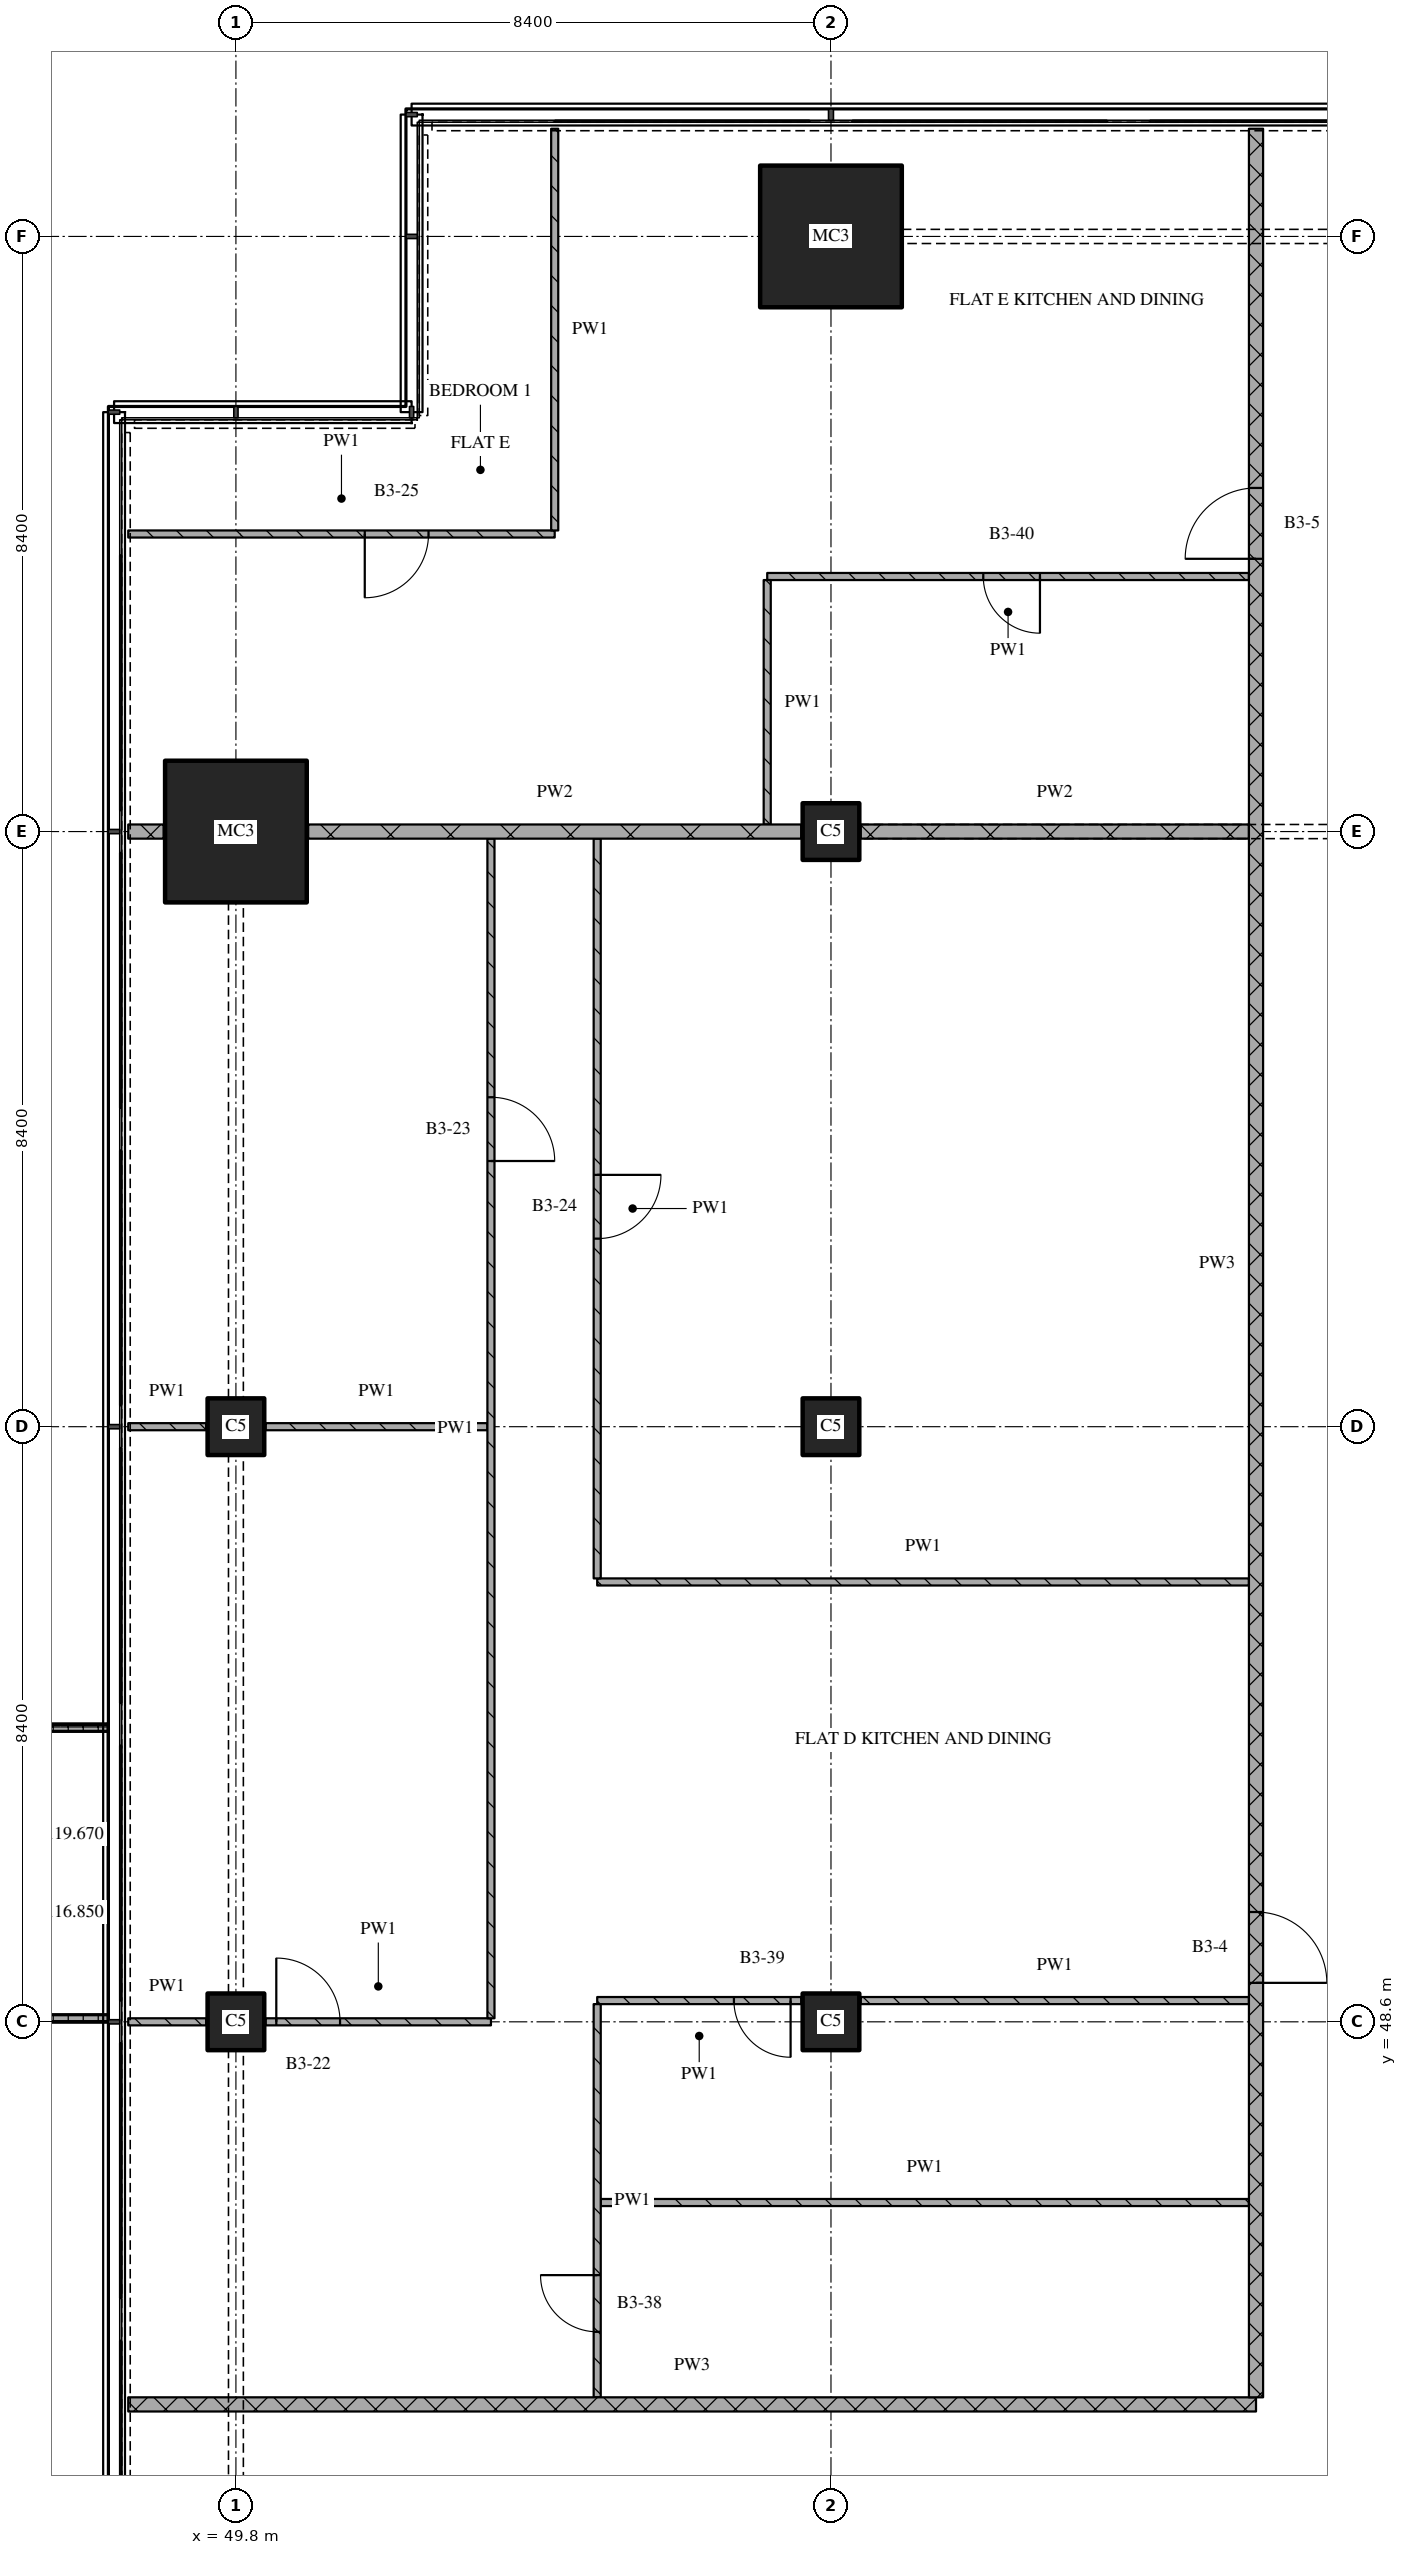
"""IFC4 building model, lengths in metres.
Left out: names, types, materials, properties, quantities, classifications, styles, units other than length and angle.
Written with IfcOpenShell. Run it as: python <this file> out.ifc"""

import sys

from ifc_helpers import new_model, si_unit, direction, frame, frame_2d, origin, origin_2d, place, context, subcontext, project, spatial, polyline, rectangle, outline, extrude, element, fill, save


model = new_model("IFC4")
c1 = context("Model", 3, precision=1e-05, world=origin(), true_north=direction((0.0, 1.0)))
c2 = subcontext(c1, "Body", "Model", "MODEL_VIEW")
j1 = project(units=[si_unit("LENGTHUNIT", "METRE"), si_unit("PLANEANGLEUNIT", "RADIAN")], contexts=[c1])
p1 = place(None, origin())
s1 = spatial("IfcSite", under=j1, at=p1, CompositionType="ELEMENT")
p2 = place(p1, origin())
s2 = spatial("IfcBuilding", under=s1, at=p2, CompositionType="ELEMENT")
p3 = place(p2, frame((0.0, 0.0, 116.85)))
s3 = spatial("IfcBuildingStorey", under=s2, at=p3, CompositionType="ELEMENT", Elevation=116.85)
for number, where, z_axis, x_axis in (
    (1, (49.8, 48.6, 0.0), (0.0, 0.0, 1.0), (1.0, 0.0, 0.0)),
    (2, (49.8, 57.0, 0.0), (0.0, 0.0, 1.0), (1.0, 0.0, 0.0)),
):
    element("IfcColumn", number, at=place(p3, frame(where, z_axis=z_axis, x_axis=x_axis)), inside=s3, PredefinedType="COLUMN", context=c2, shape_type="SweptSolid", body=[
        extrude(rectangle(XDim=0.8, YDim=0.8, at=origin_2d()), origin(), (0.0, 0.0, 1.0), 3.6),
    ])
p4 = place(p3, frame((49.8, 65.4, 0.0), z_axis=(0.0, 0.0, 1.0), x_axis=(1.0, 0.0, 0.0)))
e3 = element("IfcColumn", 3, at=p4, inside=s3, PredefinedType="COLUMN", context=c2, shape_type="SweptSolid", body=[
    extrude(rectangle(XDim=2.0, YDim=2.0, at=origin_2d()), origin(), (0.0, 0.0, 1.0), 3.6),
])
for number, where, z_axis, x_axis in (
    (4, (58.2, 48.6, 0.0), (0.0, 0.0, 1.0), (1.0, 0.0, 0.0)),
    (5, (58.2, 57.0, 0.0), (0.0, 0.0, 1.0), (1.0, 0.0, 0.0)),
    (6, (58.2, 65.4, 0.0), (0.0, 0.0, 1.0), (1.0, 0.0, 0.0)),
):
    element("IfcColumn", number, at=place(p3, frame(where, z_axis=z_axis, x_axis=x_axis)), inside=s3, PredefinedType="COLUMN", context=c2, shape_type="SweptSolid", body=[
        extrude(rectangle(XDim=0.8, YDim=0.8, at=origin_2d()), origin(), (0.0, 0.0, 1.0), 3.6),
    ])
p5 = place(p3, frame((58.2, 73.8, 0.0), z_axis=(0.0, 0.0, 1.0), x_axis=(1.0, 0.0, 0.0)))
e7 = element("IfcColumn", 7, at=p5, inside=s3, PredefinedType="COLUMN", context=c2, shape_type="SweptSolid", body=[
    extrude(rectangle(XDim=2.0, YDim=2.0, at=origin_2d()), origin(), (0.0, 0.0, 1.0), 3.6),
])
p6 = place(p3, origin())
e8 = element("IfcWall", 8, at=p6, inside=s3, PredefinedType="SOLIDWALL", context=c2, shape_type="SweptSolid", body=[
    extrude(outline(polyline([(48.0, 52.8), (48.0, 52.7), (46.367, 52.7), (46.367, 48.7), (48.0, 48.7), (48.0, 48.6), (46.267, 48.6), (46.267, 52.8), (48.0, 52.8)])), origin(), (0.0, 0.0, 1.0), 1.0),
])
p7 = place(p3, frame((48.28, 43.2, 0.0), z_axis=(0.0, 0.0, 1.0), x_axis=(1.0, 0.0, 0.0)))
e9 = element("IfcWall", 9, at=p7, inside=s3, PredefinedType="PARTITIONING", context=c2, shape_type="SweptSolid", body=[
    extrude(rectangle(XDim=15.92, YDim=0.2, at=frame_2d((7.96, 0.0))), origin(), (0.0, 0.0, 1.0), 3.32),
])
p8 = place(p3, frame((54.95, 46.05, 0.0), z_axis=(0.0, 0.0, 1.0), x_axis=(1.0, 0.0, 0.0)))
e10 = element("IfcWall", 10, at=p8, inside=s3, PredefinedType="PARTITIONING", context=c2, shape_type="SweptSolid", body=[
    extrude(rectangle(XDim=9.15, YDim=0.1, at=frame_2d((4.575, 0.0))), origin(), (0.0, 0.0, 1.0), 3.32),
])
p9 = place(p3, frame((48.28, 48.6, 0.0), z_axis=(0.0, 0.0, 1.0), x_axis=(1.0, 0.0, 0.0)))
e11 = element("IfcWall", 11, at=p9, inside=s3, PredefinedType="PARTITIONING", context=c2, shape_type="SweptSolid", body=[
    extrude(rectangle(XDim=1.1, YDim=0.1, at=frame_2d((0.55, 0.0))), origin(), (0.0, 0.0, 1.0), 3.32),
])
p10 = place(p3, frame((50.22, 48.6, 0.0), z_axis=(0.0, 0.0, 1.0), x_axis=(1.0, 0.0, 0.0)))
e12 = element("IfcWall", 12, at=p10, inside=s3, PredefinedType="PARTITIONING", context=c2, shape_type="SweptSolid", body=[
    extrude(rectangle(XDim=3.18, YDim=0.1, at=frame_2d((1.59, 0.0))), origin(), (0.0, 0.0, 1.0), 3.32),
])
p11 = place(p10, frame((0.15, 0.0, 0.0)))
e13 = element("IfcOpeningElement", 13, at=p11, cuts=e12, PredefinedType="OPENING", context=c2, shape_type="SweptSolid", body=[
    extrude(rectangle(XDim=0.9, YDim=2.1, at=frame_2d((0.45, 1.05))), frame((0.0, 0.06, 0.0), z_axis=(0.0, -1.0, 0.0), x_axis=(1.0, 0.0, 0.0)), (0.0, 0.0, 1.0), 0.12),
])
p12 = place(p3, frame((57.78, 48.9, 0.0), z_axis=(0.0, 0.0, 1.0), x_axis=(-1.0, 0.0, 0.0)))
e14 = element("IfcWall", 14, at=p12, inside=s3, PredefinedType="PARTITIONING", context=c2, shape_type="SweptSolid", body=[
    extrude(rectangle(XDim=2.88, YDim=0.1, at=frame_2d((1.44, 0.0))), origin(), (0.0, 0.0, 1.0), 3.32),
])
p13 = place(p12, frame((0.15, 0.0, 0.0)))
e15 = element("IfcOpeningElement", 15, at=p13, cuts=e14, PredefinedType="OPENING", context=c2, shape_type="SweptSolid", body=[
    extrude(rectangle(XDim=0.8, YDim=2.1, at=frame_2d((0.4, 1.05))), frame((0.0, 0.06, 0.0), z_axis=(0.0, -1.0, 0.0), x_axis=(1.0, 0.0, 0.0)), (0.0, 0.0, 1.0), 0.12),
])
p14 = place(p3, frame((58.62, 48.9, 0.0), z_axis=(0.0, 0.0, 1.0), x_axis=(1.0, 0.0, 0.0)))
e16 = element("IfcWall", 16, at=p14, inside=s3, PredefinedType="PARTITIONING", context=c2, shape_type="SweptSolid", body=[
    extrude(rectangle(XDim=5.48, YDim=0.1, at=frame_2d((2.74, 0.0))), origin(), (0.0, 0.0, 1.0), 3.32),
])
p15 = place(p3, frame((54.9, 54.809, 0.0), z_axis=(0.0, 0.0, 1.0), x_axis=(1.0, 0.0, 0.0)))
e17 = element("IfcWall", 17, at=p15, inside=s3, PredefinedType="PARTITIONING", context=c2, shape_type="SweptSolid", body=[
    extrude(rectangle(XDim=9.2, YDim=0.1, at=frame_2d((4.6, 0.0))), origin(), (0.0, 0.0, 1.0), 3.32),
])
p16 = place(p3, frame((48.28, 57.0, 0.0), z_axis=(0.0, 0.0, 1.0), x_axis=(1.0, 0.0, 0.0)))
e18 = element("IfcWall", 18, at=p16, inside=s3, PredefinedType="PARTITIONING", context=c2, shape_type="SweptSolid", body=[
    extrude(rectangle(XDim=1.1, YDim=0.1, at=frame_2d((0.55, 0.0))), origin(), (0.0, 0.0, 1.0), 3.32),
])
p17 = place(p3, frame((50.22, 57.0, 0.0), z_axis=(0.0, 0.0, 1.0), x_axis=(1.0, 0.0, 0.0)))
e19 = element("IfcWall", 19, at=p17, inside=s3, PredefinedType="PARTITIONING", context=c2, shape_type="SweptSolid", body=[
    extrude(rectangle(XDim=3.13, YDim=0.1, at=frame_2d((1.565, 0.0))), origin(), (0.0, 0.0, 1.0), 3.32),
])
p18 = place(p3, frame((48.28, 65.4, 0.0), z_axis=(0.0, 0.0, 1.0), x_axis=(1.0, 0.0, 0.0)))
e20 = element("IfcWall", 20, at=p18, inside=s3, PredefinedType="PARTITIONING", context=c2, shape_type="SweptSolid", body=[
    extrude(rectangle(XDim=0.5, YDim=0.2, at=frame_2d((0.25, 0.0))), origin(), (0.0, 0.0, 1.0), 3.32),
])
p19 = place(p3, frame((50.82, 65.4, 0.0), z_axis=(0.0, 0.0, 1.0), x_axis=(1.0, 0.0, 0.0)))
e21 = element("IfcWall", 21, at=p19, inside=s3, PredefinedType="PARTITIONING", context=c2, shape_type="SweptSolid", body=[
    extrude(rectangle(XDim=6.96, YDim=0.2, at=frame_2d((3.48, 0.0))), origin(), (0.0, 0.0, 1.0), 3.32),
])
p20 = place(p3, frame((58.62, 65.4, 0.0), z_axis=(0.0, 0.0, 1.0), x_axis=(1.0, 0.0, 0.0)))
e22 = element("IfcWall", 22, at=p20, inside=s3, PredefinedType="PARTITIONING", context=c2, shape_type="SweptSolid", body=[
    extrude(rectangle(XDim=5.48, YDim=0.2, at=frame_2d((2.74, 0.0))), origin(), (0.0, 0.0, 1.0), 2.82),
])
p21 = place(p3, frame((64.1, 69.0, 0.0), z_axis=(0.0, 0.0, 1.0), x_axis=(-1.0, 0.0, 0.0)))
e23 = element("IfcWall", 23, at=p21, inside=s3, PredefinedType="PARTITIONING", context=c2, shape_type="SweptSolid", body=[
    extrude(rectangle(XDim=6.8, YDim=0.1, at=frame_2d((3.4, 0.0))), origin(), (0.0, 0.0, 1.0), 3.32),
])
p22 = place(p21, frame((2.95, 0.0, 0.0)))
e24 = element("IfcOpeningElement", 24, at=p22, cuts=e23, PredefinedType="OPENING", context=c2, shape_type="SweptSolid", body=[
    extrude(rectangle(XDim=0.8, YDim=2.1, at=frame_2d((0.4, 1.05))), frame((0.0, 0.06, 0.0), z_axis=(0.0, -1.0, 0.0), x_axis=(1.0, 0.0, 0.0)), (0.0, 0.0, 1.0), 0.12),
])
p23 = place(p3, frame((48.28, 69.6, 0.0), z_axis=(0.0, 0.0, 1.0), x_axis=(1.0, 0.0, 0.0)))
e25 = element("IfcWall", 25, at=p23, inside=s3, PredefinedType="PARTITIONING", context=c2, shape_type="SweptSolid", body=[
    extrude(rectangle(XDim=6.02, YDim=0.1, at=frame_2d((3.01, 0.0))), origin(), (0.0, 0.0, 1.0), 3.32),
])
p24 = place(p23, frame((3.339, 0.0, 0.0)))
e26 = element("IfcOpeningElement", 26, at=p24, cuts=e25, PredefinedType="OPENING", context=c2, shape_type="SweptSolid", body=[
    extrude(rectangle(XDim=0.9, YDim=2.1, at=frame_2d((0.45, 1.05))), frame((0.0, 0.06, 0.0), z_axis=(0.0, -1.0, 0.0), x_axis=(1.0, 0.0, 0.0)), (0.0, 0.0, 1.0), 0.12),
])
p25 = place(p3, frame((53.4, 48.65, 0.0), z_axis=(0.0, 0.0, 1.0), x_axis=(0.0, 1.0, 0.0)))
e27 = element("IfcWall", 27, at=p25, inside=s3, PredefinedType="PARTITIONING", context=c2, shape_type="SweptSolid", body=[
    extrude(rectangle(XDim=16.65, YDim=0.1, at=frame_2d((8.325, 0.0))), origin(), (0.0, 0.0, 1.0), 3.32),
])
p26 = place(p25, frame((12.1, 0.0, 0.0)))
e28 = element("IfcOpeningElement", 28, at=p26, cuts=e27, PredefinedType="OPENING", context=c2, shape_type="SweptSolid", body=[
    extrude(rectangle(XDim=0.9, YDim=2.1, at=frame_2d((0.45, 1.05))), frame((0.0, 0.06, 0.0), z_axis=(0.0, -1.0, 0.0), x_axis=(1.0, 0.0, 0.0)), (0.0, 0.0, 1.0), 0.12),
])
p27 = place(p3, frame((54.3, 75.32, 0.0), z_axis=(0.0, 0.0, 1.0), x_axis=(0.0, -1.0, 0.0)))
e29 = element("IfcWall", 29, at=p27, inside=s3, PredefinedType="PARTITIONING", context=c2, shape_type="SweptSolid", body=[
    extrude(rectangle(XDim=5.67, YDim=0.1, at=frame_2d((2.835, 0.0))), origin(), (0.0, 0.0, 1.0), 3.32),
])
p28 = place(p3, frame((54.9, 48.85, 0.0), z_axis=(0.0, 0.0, 1.0), x_axis=(0.0, -1.0, 0.0)))
e30 = element("IfcWall", 30, at=p28, inside=s3, PredefinedType="PARTITIONING", context=c2, shape_type="SweptSolid", body=[
    extrude(rectangle(XDim=5.55, YDim=0.1, at=frame_2d((2.775, 0.0))), origin(), (0.0, 0.0, 1.0), 3.32),
])
p29 = place(p28, frame((3.825, 0.0, 0.0)))
e31 = element("IfcOpeningElement", 31, at=p29, cuts=e30, PredefinedType="OPENING", context=c2, shape_type="SweptSolid", body=[
    extrude(rectangle(XDim=0.8, YDim=2.1, at=frame_2d((0.4, 1.05))), frame((0.0, 0.06, 0.0), z_axis=(0.0, -1.0, 0.0), x_axis=(1.0, 0.0, 0.0)), (0.0, 0.0, 1.0), 0.12),
])
p30 = place(p3, frame((54.9, 65.3, 0.0), z_axis=(0.0, 0.0, 1.0), x_axis=(0.0, -1.0, 0.0)))
e32 = element("IfcWall", 32, at=p30, inside=s3, PredefinedType="PARTITIONING", context=c2, shape_type="SweptSolid", body=[
    extrude(rectangle(XDim=10.441, YDim=0.1, at=frame_2d((5.221, 0.0))), origin(), (0.0, 0.0, 1.0), 3.32),
])
p31 = place(p30, frame((4.746, 0.0, 0.0)))
e33 = element("IfcOpeningElement", 33, at=p31, cuts=e32, PredefinedType="OPENING", context=c2, shape_type="SweptSolid", body=[
    extrude(rectangle(XDim=0.9, YDim=2.1, at=frame_2d((0.45, 1.05))), frame((0.0, 0.06, 0.0), z_axis=(0.0, -1.0, 0.0), x_axis=(1.0, 0.0, 0.0)), (0.0, 0.0, 1.0), 0.12),
])
p32 = place(p3, frame((57.3, 68.95, 0.0), z_axis=(0.0, 0.0, 1.0), x_axis=(0.0, -1.0, 0.0)))
e34 = element("IfcWall", 34, at=p32, inside=s3, PredefinedType="PARTITIONING", context=c2, shape_type="SweptSolid", body=[
    extrude(rectangle(XDim=3.45, YDim=0.1, at=frame_2d((1.725, 0.0))), origin(), (0.0, 0.0, 1.0), 3.32),
])
p33 = place(p3, frame((64.2, 43.3, 0.0), z_axis=(0.0, 0.0, 1.0), x_axis=(0.0, 1.0, 0.0)))
e35 = element("IfcWall", 35, at=p33, inside=s3, PredefinedType="PARTITIONING", context=c2, shape_type="SweptSolid", body=[
    extrude(rectangle(XDim=32.02, YDim=0.2, at=frame_2d((16.01, 0.0))), origin(), (0.0, 0.0, 1.0), 3.32),
])
p34 = place(p33, frame((5.85, 0.0, 0.0)))
e36 = element("IfcOpeningElement", 36, at=p34, cuts=e35, PredefinedType="OPENING", context=c2, shape_type="SweptSolid", body=[
    extrude(rectangle(XDim=1.0, YDim=2.1, at=frame_2d((0.5, 1.05))), frame((0.0, 0.11, 0.0), z_axis=(0.0, -1.0, 0.0), x_axis=(1.0, 0.0, 0.0)), (0.0, 0.0, 1.0), 0.22),
])
p35 = place(p33, frame((25.95, 0.0, 0.0)))
e37 = element("IfcOpeningElement", 37, at=p35, cuts=e35, PredefinedType="OPENING", context=c2, shape_type="SweptSolid", body=[
    extrude(rectangle(XDim=1.0, YDim=2.1, at=frame_2d((0.5, 1.05))), frame((0.0, 0.11, 0.0), z_axis=(0.0, -1.0, 0.0), x_axis=(1.0, 0.0, 0.0)), (0.0, 0.0, 1.0), 0.22),
])
p36 = place(p11, origin())
e38 = element("IfcDoor", 38, at=p36, inside=s3, OperationType="SINGLE_SWING_LEFT", PredefinedType="DOOR", context=c2, shape_type="SweptSolid", body=[
    extrude(rectangle(XDim=0.9, YDim=2.1, at=frame_2d((0.45, 1.05))), frame((0.0, 0.025, 0.0), z_axis=(0.0, -1.0, 0.0), x_axis=(1.0, 0.0, 0.0)), (0.0, 0.0, 1.0), 0.05),
])
fill(e13, e38)
p37 = place(p13, origin())
e39 = element("IfcDoor", 39, at=p37, inside=s3, OperationType="SINGLE_SWING_LEFT", PredefinedType="DOOR", context=c2, shape_type="SweptSolid", body=[
    extrude(rectangle(XDim=0.8, YDim=2.1, at=frame_2d((0.4, 1.05))), frame((0.0, 0.025, 0.0), z_axis=(0.0, -1.0, 0.0), x_axis=(1.0, 0.0, 0.0)), (0.0, 0.0, 1.0), 0.05),
])
fill(e15, e39)
p38 = place(p22, origin())
e40 = element("IfcDoor", 40, at=p38, inside=s3, OperationType="SINGLE_SWING_LEFT", PredefinedType="DOOR", context=c2, shape_type="SweptSolid", body=[
    extrude(rectangle(XDim=0.8, YDim=2.1, at=frame_2d((0.4, 1.05))), frame((0.0, 0.025, 0.0), z_axis=(0.0, -1.0, 0.0), x_axis=(1.0, 0.0, 0.0)), (0.0, 0.0, 1.0), 0.05),
])
fill(e24, e40)
p39 = place(p24, origin())
e41 = element("IfcDoor", 41, at=p39, inside=s3, OperationType="SINGLE_SWING_RIGHT", PredefinedType="DOOR", context=c2, shape_type="SweptSolid", body=[
    extrude(rectangle(XDim=0.9, YDim=2.1, at=frame_2d((0.45, 1.05))), frame((0.0, 0.025, 0.0), z_axis=(0.0, -1.0, 0.0), x_axis=(1.0, 0.0, 0.0)), (0.0, 0.0, 1.0), 0.05),
])
fill(e26, e41)
p40 = place(p26, origin())
e42 = element("IfcDoor", 42, at=p40, inside=s3, OperationType="SINGLE_SWING_RIGHT", PredefinedType="DOOR", context=c2, shape_type="SweptSolid", body=[
    extrude(rectangle(XDim=0.9, YDim=2.1, at=frame_2d((0.45, 1.05))), frame((0.0, 0.025, 0.0), z_axis=(0.0, -1.0, 0.0), x_axis=(1.0, 0.0, 0.0)), (0.0, 0.0, 1.0), 0.05),
])
fill(e28, e42)
p41 = place(p29, origin())
e43 = element("IfcDoor", 43, at=p41, inside=s3, OperationType="SINGLE_SWING_RIGHT", PredefinedType="DOOR", context=c2, shape_type="SweptSolid", body=[
    extrude(rectangle(XDim=0.8, YDim=2.1, at=frame_2d((0.4, 1.05))), frame((0.0, 0.025, 0.0), z_axis=(0.0, -1.0, 0.0), x_axis=(1.0, 0.0, 0.0)), (0.0, 0.0, 1.0), 0.05),
])
fill(e31, e43)
p42 = place(p31, origin())
e44 = element("IfcDoor", 44, at=p42, inside=s3, OperationType="SINGLE_SWING_LEFT", PredefinedType="DOOR", context=c2, shape_type="SweptSolid", body=[
    extrude(rectangle(XDim=0.9, YDim=2.1, at=frame_2d((0.45, 1.05))), frame((0.0, 0.025, 0.0), z_axis=(0.0, -1.0, 0.0), x_axis=(1.0, 0.0, 0.0)), (0.0, 0.0, 1.0), 0.05),
])
fill(e33, e44)
p43 = place(p34, origin())
e45 = element("IfcDoor", 45, at=p43, inside=s3, OperationType="SINGLE_SWING_RIGHT", PredefinedType="DOOR", context=c2, shape_type="SweptSolid", body=[
    extrude(rectangle(XDim=1.0, YDim=2.1, at=frame_2d((0.5, 1.05))), frame((0.0, 0.025, 0.0), z_axis=(0.0, -1.0, 0.0), x_axis=(1.0, 0.0, 0.0)), (0.0, 0.0, 1.0), 0.05),
])
fill(e36, e45)
p44 = place(p35, origin())
e46 = element("IfcDoor", 46, at=p44, inside=s3, OperationType="SINGLE_SWING_LEFT", PredefinedType="DOOR", context=c2, shape_type="SweptSolid", body=[
    extrude(rectangle(XDim=1.0, YDim=2.1, at=frame_2d((0.5, 1.05))), frame((0.0, 0.025, 0.0), z_axis=(0.0, -1.0, 0.0), x_axis=(1.0, 0.0, 0.0)), (0.0, 0.0, 1.0), 0.05),
])
fill(e37, e46)
save(model, sys.argv[1])
